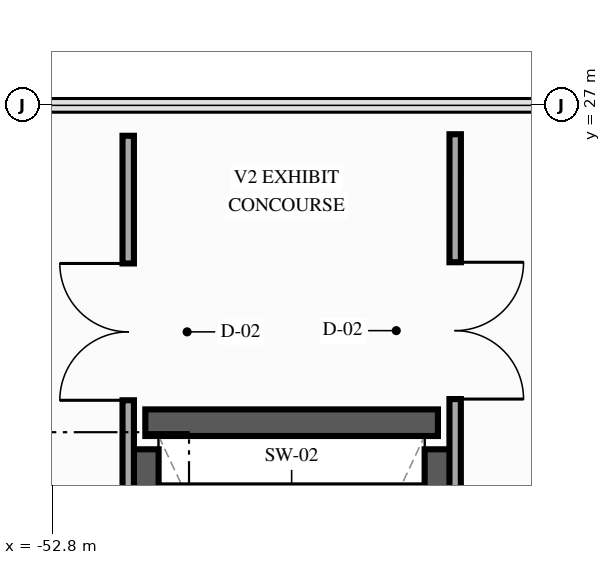
"""IFC4 building model, lengths in metres.
Left out: names, types, materials, properties, quantities, classifications, styles, units other than length and angle.
Written with IfcOpenShell. Run it as: python <this file> out.ifc"""

import sys

from ifc_helpers import new_model, si_unit, direction, frame, frame_2d, origin, place, context, subcontext, project, spatial, rectangle, extrude, element, fill, save


model = new_model("IFC4")
c1 = context("Model", 3, precision=1e-05, world=origin(), true_north=direction((0.0, 1.0)))
c2 = subcontext(c1, "Body", "Model", "MODEL_VIEW")
j1 = project(units=[si_unit("LENGTHUNIT", "METRE"), si_unit("PLANEANGLEUNIT", "RADIAN")], contexts=[c1])
p1 = place(None, origin())
s1 = spatial("IfcSite", under=j1, at=p1, CompositionType="ELEMENT")
p2 = place(p1, origin())
s2 = spatial("IfcBuilding", under=s1, at=p2, CompositionType="ELEMENT")
p3 = place(p2, origin())
s3 = spatial("IfcBuildingStorey", under=s2, at=p3, CompositionType="ELEMENT", Elevation=0.0)
p4 = place(p3, frame((-51.575, 22.825, 0.0), z_axis=(0.0, 0.0, 1.0), x_axis=(1.0, 0.0, 0.0)))
e1 = element("IfcWall", 1, at=p4, inside=s3, PredefinedType="SHEAR", context=c2, shape_type="SweptSolid", body=[
    extrude(rectangle(XDim=3.85, YDim=0.35, at=frame_2d((1.925, 0.0))), origin(), (0.0, 0.0, 1.0), 5.12),
])
for number, where, z_axis, x_axis in (
    (2, (-51.575, 13.375, 0.0), (0.0, 0.0, 1.0), (0.0, 1.0, 0.0)),
    (3, (-47.725, 13.375, 0.0), (0.0, 0.0, 1.0), (0.0, 1.0, 0.0)),
):
    element("IfcWall", number, at=place(p3, frame(where, z_axis=z_axis, x_axis=x_axis)), inside=s3, PredefinedType="SHEAR", context=c2, shape_type="SweptSolid", body=[
        extrude(rectangle(XDim=9.1, YDim=0.35, at=frame_2d((4.55, 0.0))), origin(), (0.0, 0.0, 1.0), 5.12),
    ])
p5 = place(p3, frame((-51.8, 13.7, 0.0), z_axis=(0.0, 0.0, 1.0), x_axis=(0.0, 1.0, 0.0)))
e4 = element("IfcWall", 4, at=p5, inside=s3, PredefinedType="PARTITIONING", context=c2, shape_type="SweptSolid", body=[
    extrude(rectangle(XDim=12.9, YDim=0.15, at=frame_2d((6.45, 0.0))), origin(), (0.0, 0.0, 1.0), 4.405),
])
p6 = place(p5, frame((9.42, 0.0, 0.0)))
e5 = element("IfcOpeningElement", 5, at=p6, cuts=e4, PredefinedType="OPENING", context=c2, shape_type="SweptSolid", body=[
    extrude(rectangle(XDim=1.8, YDim=2.3, at=frame_2d((0.9, 1.15))), frame((0.0, 0.085, 0.0), z_axis=(0.0, -1.0, 0.0), x_axis=(1.0, 0.0, 0.0)), (0.0, 0.0, 1.0), 0.17),
])
p7 = place(p3, frame((-47.498, 26.62, 0.0), z_axis=(0.0, 0.0, 1.0), x_axis=(-0.000151168721, -0.999999988574, 0.0)))
e6 = element("IfcWall", 6, at=p7, inside=s3, PredefinedType="PARTITIONING", context=c2, shape_type="SweptSolid", body=[
    extrude(rectangle(XDim=12.92, YDim=0.15, at=frame_2d((6.46, 0.0))), origin(), (0.0, 0.0, 1.0), 4.405),
])
p8 = place(p7, frame((1.684, 0.0, 0.0)))
e7 = element("IfcOpeningElement", 7, at=p8, cuts=e6, PredefinedType="OPENING", context=c2, shape_type="SweptSolid", body=[
    extrude(rectangle(XDim=1.8, YDim=2.3, at=frame_2d((0.9, 1.15))), frame((0.0, 0.085, 0.0), z_axis=(0.0, -1.0, 0.0), x_axis=(1.0, 0.0, 0.0)), (0.0, 0.0, 1.0), 0.17),
])
p9 = place(p6, origin())
e8 = element("IfcDoor", 8, at=p9, inside=s3, OperationType="DOUBLE_DOOR_SINGLE_SWING", PredefinedType="DOOR", context=c2, shape_type="SweptSolid", body=[
    extrude(rectangle(XDim=1.8, YDim=2.3, at=frame_2d((0.9, 1.15))), frame((0.0, 0.025, 0.0), z_axis=(0.0, -1.0, 0.0), x_axis=(1.0, 0.0, 0.0)), (0.0, 0.0, 1.0), 0.05),
])
fill(e5, e8)
p10 = place(p8, origin())
e9 = element("IfcDoor", 9, at=p10, inside=s3, OperationType="DOUBLE_DOOR_SINGLE_SWING", PredefinedType="DOOR", context=c2, shape_type="SweptSolid", body=[
    extrude(rectangle(XDim=1.8, YDim=2.3, at=frame_2d((0.9, 1.15))), frame((0.0, 0.025, 0.0), z_axis=(0.0, -1.0, 0.0), x_axis=(1.0, 0.0, 0.0)), (0.0, 0.0, 1.0), 0.05),
])
fill(e7, e9)
save(model, sys.argv[1])
